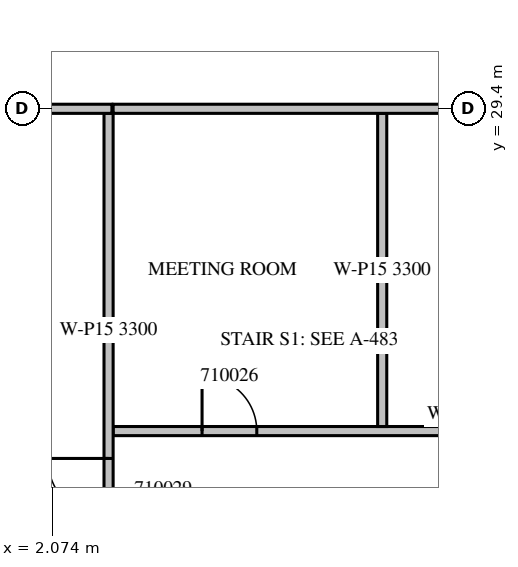
"""IFC4 building model, lengths in metres.
Left out: names, types, materials, properties, quantities, classifications, styles, units other than length and angle.
Written with IfcOpenShell. Run it as: python <this file> out.ifc"""

import sys

from ifc_helpers import new_model, si_unit, direction, frame, frame_2d, origin, place, context, subcontext, project, spatial, rectangle, extrude, source, transform, mapped, element, fill, save


model = new_model("IFC4")
c1 = context("Model", 3, precision=1e-05, world=origin(), true_north=direction((0.0, 1.0)))
c2 = subcontext(c1, "Body", "Model", "MODEL_VIEW")
j1 = project(units=[si_unit("LENGTHUNIT", "METRE"), si_unit("PLANEANGLEUNIT", "RADIAN")], contexts=[c1])
p1 = place(None, origin())
s1 = spatial("IfcSite", under=j1, at=p1, CompositionType="ELEMENT")
p2 = place(p1, origin())
s2 = spatial("IfcBuilding", under=s1, at=p2, CompositionType="ELEMENT")
p3 = place(p2, frame((0.0, 0.0, 53.1)))
s3 = spatial("IfcBuildingStorey", under=s2, at=p3, CompositionType="ELEMENT", Elevation=53.1)
m1 = source(origin(), c2, "Body", "SweptSolid", [
    extrude(rectangle(XDim=11.925, YDim=0.15, at=frame_2d((5.963, 0.0))), origin(), (0.0, 0.0, 1.0), 2.8),
])
p4 = place(p3, frame((3.075, 24.1, 0.0), z_axis=(0.0, 0.0, 1.0), x_axis=(1.0, 0.0, 0.0)))
e1 = element("IfcWall", 1, at=p4, inside=s3, PredefinedType="PARTITIONING", context=c2, shape_type="MappedRepresentation", body=[
    mapped(m1, transform((0.0, 0.0, 0.0), scale=1.0)),
])
m2 = source(origin(), c2, "Body", "SweptSolid", [
    extrude(rectangle(XDim=0.9, YDim=2.1, at=frame_2d((0.45, 1.05))), frame((0.0, 0.085, 0.0), z_axis=(0.0, -1.0, 0.0), x_axis=(1.0, 0.0, 0.0)), (0.0, 0.0, 1.0), 0.17),
])
p5 = place(p4, frame((1.462, 0.0, 0.0)))
e2 = element("IfcOpeningElement", 2, at=p5, cuts=e1, PredefinedType="OPENING", context=c2, shape_type="MappedRepresentation", body=[
    mapped(m2, transform((0.0, 0.0, 0.0), scale=1.0)),
])
p6 = place(p4, frame((8.3, 0.0, 0.0)))
e3 = element("IfcOpeningElement", 3, at=p6, cuts=e1, PredefinedType="OPENING", context=c2, shape_type="MappedRepresentation", body=[
    mapped(m2, transform((0.0, 0.0, 0.0), scale=1.0)),
])
m3 = source(origin(), c2, "Body", "SweptSolid", [
    extrude(rectangle(XDim=5.15, YDim=0.15, at=frame_2d((2.575, 0.0))), origin(), (0.0, 0.0, 1.0), 3.3),
])
p7 = place(p3, frame((7.5, 24.175, 0.0), z_axis=(0.0, 0.0, 1.0), x_axis=(0.0, 1.0, 0.0)))
e4 = element("IfcWall", 4, at=p7, inside=s3, PredefinedType="PARTITIONING", context=c2, shape_type="MappedRepresentation", body=[
    mapped(m3, transform((0.0, 0.0, 0.0), scale=1.0)),
])
m4 = source(origin(), c2, "Body", "SweptSolid", [
    extrude(rectangle(XDim=6.826, YDim=0.15, at=frame_2d((3.413, 0.0))), origin(), (0.0, 0.0, 1.0), 3.8),
])
p8 = place(p3, frame((9.901, 29.4, 0.0), z_axis=(0.0, 0.0, 1.0), x_axis=(-1.0, 0.0, 0.0)))
e5 = element("IfcWall", 5, at=p8, inside=s3, PredefinedType="PARTITIONING", context=c2, shape_type="MappedRepresentation", body=[
    mapped(m4, transform((0.0, 0.0, 0.0), scale=1.0)),
])
m5 = source(origin(), c2, "Body", "SweptSolid", [
    extrude(rectangle(XDim=7.125, YDim=0.15, at=frame_2d((3.562, 0.0))), origin(), (0.0, 0.0, 1.0), 3.3),
])
p9 = place(p3, frame((3.0, 29.325, 0.0), z_axis=(0.0, 0.0, 1.0), x_axis=(0.0, -1.0, 0.0)))
e6 = element("IfcWall", 6, at=p9, inside=s3, PredefinedType="PARTITIONING", context=c2, shape_type="MappedRepresentation", body=[
    mapped(m5, transform((0.0, 0.0, 0.0), scale=1.0)),
])
m6 = source(origin(), c2, "Body", "SweptSolid", [
    extrude(rectangle(XDim=1.0, YDim=2.1, at=frame_2d((0.5, 1.05))), frame((0.0, 0.085, 0.0), z_axis=(0.0, -1.0, 0.0), x_axis=(1.0, 0.0, 0.0)), (0.0, 0.0, 1.0), 0.17),
])
p10 = place(p9, frame((5.675, 0.0, 0.0)))
e7 = element("IfcOpeningElement", 7, at=p10, cuts=e6, PredefinedType="OPENING", context=c2, shape_type="MappedRepresentation", body=[
    mapped(m6, transform((0.0, 0.0, 0.0), scale=1.0)),
])
m7 = source(origin(), c2, "Body", "SweptSolid", [
    extrude(rectangle(XDim=1.856, YDim=0.15, at=frame_2d((0.928, 0.0))), origin(), (0.0, 0.0, 1.0), 3.8),
])
p11 = place(p3, frame((3.055, 29.4, 0.0), z_axis=(0.0, 0.0, 1.0), x_axis=(-1.0, 0.0, 0.0)))
e8 = element("IfcWall", 8, at=p11, inside=s3, PredefinedType="PARTITIONING", context=c2, shape_type="MappedRepresentation", body=[
    mapped(m7, transform((0.0, 0.0, 0.0), scale=1.0)),
])
m8 = source(origin(), c2, "Body", "SweptSolid", [
    extrude(rectangle(XDim=0.9, YDim=2.1, at=frame_2d((0.45, 1.05))), frame((0.0, 0.025, 0.0), z_axis=(0.0, -1.0, 0.0), x_axis=(1.0, 0.0, 0.0)), (0.0, 0.0, 1.0), 0.05),
])
p12 = place(p5, origin())
e9 = element("IfcDoor", 9, at=p12, inside=s3, OperationType="SINGLE_SWING_LEFT", PredefinedType="DOOR", context=c2, shape_type="MappedRepresentation", body=[
    mapped(m8, transform((0.0, 0.0, 0.0), scale=1.0)),
])
fill(e2, e9)
m9 = source(origin(), c2, "Body", "SweptSolid", [
    extrude(rectangle(XDim=1.0, YDim=2.1, at=frame_2d((0.5, 1.05))), frame((0.0, 0.025, 0.0), z_axis=(0.0, -1.0, 0.0), x_axis=(1.0, 0.0, 0.0)), (0.0, 0.0, 1.0), 0.05),
])
p13 = place(p10, origin())
e10 = element("IfcDoor", 10, at=p13, inside=s3, OperationType="SINGLE_SWING_RIGHT", PredefinedType="DOOR", context=c2, shape_type="MappedRepresentation", body=[
    mapped(m9, transform((0.0, 0.0, 0.0), scale=1.0)),
])
fill(e7, e10)
save(model, sys.argv[1])
